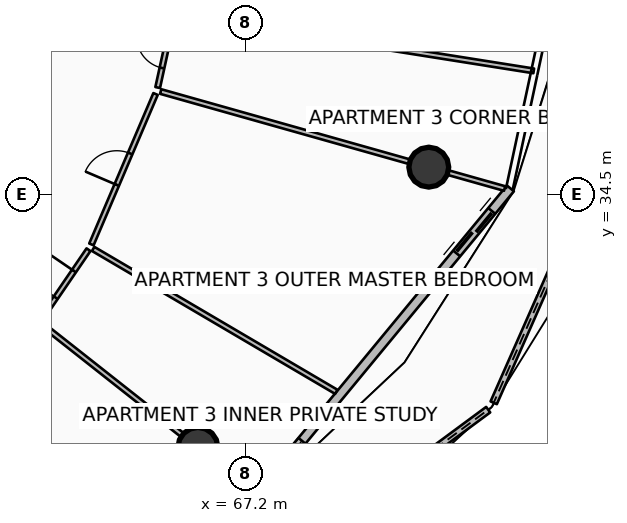
"""IFC4 building model, lengths in metres.
Left out: names, types, materials, properties, quantities, classifications, styles, units other than length and angle.
Written with IfcOpenShell. Run it as: python <this file> out.ifc"""

import sys

from ifc_helpers import new_model, si_unit, direction, frame, frame_2d, origin, origin_2d, place, context, subcontext, project, spatial, polyline, rectangle, circle, outline, extrude, element, fill, save


model = new_model("IFC4")
c1 = context("Model", 3, precision=1e-05, world=origin(), true_north=direction((0.0, 1.0)))
c2 = subcontext(c1, "Body", "Model", "MODEL_VIEW")
j1 = project(units=[si_unit("LENGTHUNIT", "METRE"), si_unit("PLANEANGLEUNIT", "RADIAN")], contexts=[c1])
p1 = place(None, origin())
s1 = spatial("IfcSite", under=j1, at=p1, CompositionType="ELEMENT")
p2 = place(p1, origin())
s2 = spatial("IfcBuilding", under=s1, at=p2, CompositionType="ELEMENT")
p3 = place(p2, frame((0.0, 0.0, 184.05)))
s3 = spatial("IfcBuildingStorey", under=s2, at=p3, CompositionType="ELEMENT", Elevation=184.05)
for number, where, z_axis, x_axis in (
    (1, (65.944, 27.854, 0.0), (0.0, 0.0, 1.0), (1.0, 0.0, 0.0)),
    (2, (72.02, 35.226, 0.0), (0.0, 0.0, 1.0), (1.0, 0.0, 0.0)),
):
    element("IfcColumn", number, at=place(p3, frame(where, z_axis=z_axis, x_axis=x_axis)), inside=s3, PredefinedType="COLUMN", context=c2, shape_type="SweptSolid", body=[
        extrude(circle(Radius=0.525, at=origin_2d()), origin(), (0.0, 0.0, 1.0), 3.5),
    ])
p4 = place(p3, frame((64.914, 22.439, 0.0), z_axis=(0.0, 0.0, 1.0), x_axis=(0.804266043661, 0.594269409454, 0.0)))
e3 = element("IfcWall", 3, at=p4, inside=s3, PredefinedType="PARAPET", context=c2, shape_type="SweptSolid", body=[
    extrude(outline(polyline([(0.0, 0.0), (10.778, 0.0), (10.778, 1.832), (5.389, 1.696), (0.0, 1.497), (0.0, 0.0)])), frame((0.0, 0.09, 0.0), z_axis=(0.0, -1.0, 0.0), x_axis=(1.0, 0.0, 0.0)), (0.0, 0.0, 1.0), 0.18),
])
p5 = place(p3, frame((73.728, 29.025, 0.0), z_axis=(0.0, 0.0, 1.0), x_axis=(0.403762319035, 0.914863918694, 0.0)))
e4 = element("IfcWall", 4, at=p5, inside=s3, PredefinedType="PARAPET", context=c2, shape_type="SweptSolid", body=[
    extrude(outline(polyline([(0.0, 0.0), (11.37, 0.0), (11.37, 1.756), (5.685, 1.853), (0.0, 1.832), (0.0, 0.0)])), frame((0.0, 0.09, 0.0), z_axis=(0.0, -1.0, 0.0), x_axis=(1.0, 0.0, 0.0)), (0.0, 0.0, 1.0), 0.18),
])
p6 = place(p3, frame((67.485, 26.576, 0.0), z_axis=(0.0, 0.0, 1.0), x_axis=(0.636759394418, 0.771062561418, 0.0)))
e5 = element("IfcWall", 5, at=p6, inside=s3, PredefinedType="SOLIDWALL", context=c2, shape_type="SweptSolid", body=[
    extrude(rectangle(XDim=10.494, YDim=0.24, at=frame_2d((5.247, 0.0))), origin(), (0.0, 0.0, 1.0), 2.45),
])
p7 = place(p6, frame((8.274, 0.0, 0.0)))
e6 = element("IfcOpeningElement", 6, at=p7, cuts=e5, PredefinedType="OPENING", context=c2, shape_type="SweptSolid", body=[
    extrude(rectangle(XDim=1.45, YDim=2.15, at=frame_2d((0.725, 1.075))), frame((0.0, 0.13, 0.0), z_axis=(0.0, -1.0, 0.0), x_axis=(1.0, 0.0, 0.0)), (0.0, 0.0, 1.0), 0.26),
])
p8 = place(p6, frame((0.28, 0.0, 0.65)))
e7 = element("IfcOpeningElement", 7, at=p8, cuts=e5, PredefinedType="OPENING", context=c2, shape_type="SweptSolid", body=[
    extrude(rectangle(XDim=1.6, YDim=1.5, at=frame_2d((0.8, 0.75))), frame((0.0, 0.13, 0.0), z_axis=(0.0, -1.0, 0.0), x_axis=(1.0, 0.0, 0.0)), (0.0, 0.0, 1.0), 0.26),
])
p9 = place(p3, frame((61.843, 31.087, 0.0), z_axis=(0.0, 0.0, 1.0), x_axis=(0.785327813677, -0.619080144299, 0.0)))
e8 = element("IfcWall", 8, at=p9, inside=s3, PredefinedType="PARTITIONING", context=c2, shape_type="SweptSolid", body=[
    extrude(rectangle(XDim=7.2, YDim=0.125, at=frame_2d((3.6, 0.0))), origin(), (0.0, 0.0, 1.0), 2.94),
])
p10 = place(p3, frame((63.188, 33.074, 0.0), z_axis=(0.0, 0.0, 1.0), x_axis=(0.862139654636, -0.506670717433, 0.0)))
e9 = element("IfcWall", 9, at=p10, inside=s3, PredefinedType="PARTITIONING", context=c2, shape_type="SweptSolid", body=[
    extrude(rectangle(XDim=7.421, YDim=0.125, at=frame_2d((3.71, 0.0))), origin(), (0.0, 0.0, 1.0), 2.94),
])
p11 = place(p3, frame((61.821, 31.232, 0.0), z_axis=(0.0, 0.0, 1.0), x_axis=(0.56426341076, 0.82559481786, 0.0)))
e10 = element("IfcWall", 10, at=p11, inside=s3, PredefinedType="PARTITIONING", context=c2, shape_type="SweptSolid", body=[
    extrude(rectangle(XDim=2.207, YDim=0.125, at=frame_2d((1.103, 0.0))), origin(), (0.0, 0.0, 1.0), 2.94),
])
p12 = place(p11, frame((0.678, 0.0, 0.0)))
e11 = element("IfcOpeningElement", 11, at=p12, cuts=e10, PredefinedType="OPENING", context=c2, shape_type="SweptSolid", body=[
    extrude(rectangle(XDim=0.85, YDim=2.06, at=frame_2d((0.425, 1.03))), frame((0.0, 0.073, 0.0), z_axis=(0.0, -1.0, 0.0), x_axis=(1.0, 0.0, 0.0)), (0.0, 0.0, 1.0), 0.145),
])
p13 = place(p3, frame((63.142, 33.193, 0.0), z_axis=(0.0, 0.0, 1.0), x_axis=(0.392302335844, 0.919836331796, 0.0)))
e12 = element("IfcWall", 12, at=p13, inside=s3, PredefinedType="PARTITIONING", context=c2, shape_type="SweptSolid", body=[
    extrude(rectangle(XDim=4.302, YDim=0.125, at=frame_2d((2.151, 0.0))), origin(), (0.0, 0.0, 1.0), 2.94),
])
p14 = place(p13, frame((1.701, 0.0, 0.0)))
e13 = element("IfcOpeningElement", 13, at=p14, cuts=e12, PredefinedType="OPENING", context=c2, shape_type="SweptSolid", body=[
    extrude(rectangle(XDim=0.9, YDim=2.08, at=frame_2d((0.45, 1.04))), frame((0.0, 0.073, 0.0), z_axis=(0.0, -1.0, 0.0), x_axis=(1.0, 0.0, 0.0)), (0.0, 0.0, 1.0), 0.145),
])
p15 = place(p3, frame((64.965, 37.215, 0.0), z_axis=(0.0, 0.0, 1.0), x_axis=(0.962454024137, -0.271444748378, 0.0)))
e14 = element("IfcWall", 14, at=p15, inside=s3, PredefinedType="PARTITIONING", context=c2, shape_type="SweptSolid", body=[
    extrude(rectangle(XDim=9.403, YDim=0.125, at=frame_2d((4.702, 0.0))), origin(), (0.0, 0.0, 1.0), 2.94),
])
p16 = place(p3, frame((65.4, 39.244, 0.0), z_axis=(0.0, 0.0, 1.0), x_axis=(0.987688031288, -0.156436417916, 0.0)))
e15 = element("IfcWall", 15, at=p16, inside=s3, PredefinedType="PARTITIONING", context=c2, shape_type="SweptSolid", body=[
    extrude(rectangle(XDim=9.498, YDim=0.125, at=frame_2d((4.749, 0.0))), origin(), (0.0, 0.0, 1.0), 2.94),
])
p17 = place(p3, frame((64.886, 37.321, 0.0), z_axis=(0.0, 0.0, 1.0), x_axis=(0.214404311004, 0.976744998156, 0.0)))
e16 = element("IfcWall", 16, at=p17, inside=s3, PredefinedType="PARTITIONING", context=c2, shape_type="SweptSolid", body=[
    extrude(rectangle(XDim=1.904, YDim=0.125, at=frame_2d((0.952, 0.0))), origin(), (0.0, 0.0, 1.0), 2.94),
])
p18 = place(p17, frame((0.527, 0.0, 0.0)))
e17 = element("IfcOpeningElement", 17, at=p18, cuts=e16, PredefinedType="OPENING", context=c2, shape_type="SweptSolid", body=[
    extrude(rectangle(XDim=0.85, YDim=2.06, at=frame_2d((0.425, 1.03))), frame((0.0, 0.073, 0.0), z_axis=(0.0, -1.0, 0.0), x_axis=(1.0, 0.0, 0.0)), (0.0, 0.0, 1.0), 0.145),
])
p19 = place(p7, origin())
e18 = element("IfcDoor", 18, at=p19, inside=s3, OperationType="DOUBLE_DOOR_SLIDING", PredefinedType="DOOR", context=c2, shape_type="SweptSolid", body=[
    extrude(rectangle(XDim=1.45, YDim=2.15, at=frame_2d((0.725, 1.075))), frame((0.0, 0.025, 0.0), z_axis=(0.0, -1.0, 0.0), x_axis=(1.0, 0.0, 0.0)), (0.0, 0.0, 1.0), 0.05),
])
fill(e6, e18)
p20 = place(p8, origin())
e19 = element("IfcWindow", 19, at=p20, inside=s3, PartitioningType="SINGLE_PANEL", PredefinedType="WINDOW", context=c2, shape_type="SweptSolid", body=[
    extrude(rectangle(XDim=1.6, YDim=1.5, at=frame_2d((0.8, 0.75))), frame((0.0, 0.03, 0.0), z_axis=(0.0, -1.0, 0.0), x_axis=(1.0, 0.0, 0.0)), (0.0, 0.0, 1.0), 0.06),
])
fill(e7, e19)
p21 = place(p12, origin())
e20 = element("IfcDoor", 20, at=p21, inside=s3, OperationType="SINGLE_SWING_RIGHT", PredefinedType="DOOR", context=c2, shape_type="SweptSolid", body=[
    extrude(rectangle(XDim=0.85, YDim=2.06, at=frame_2d((0.425, 1.03))), frame((0.0, 0.025, 0.0), z_axis=(0.0, -1.0, 0.0), x_axis=(1.0, 0.0, 0.0)), (0.0, 0.0, 1.0), 0.05),
])
fill(e11, e20)
p22 = place(p14, origin())
e21 = element("IfcDoor", 21, at=p22, inside=s3, OperationType="SINGLE_SWING_LEFT", PredefinedType="DOOR", context=c2, shape_type="SweptSolid", body=[
    extrude(rectangle(XDim=0.9, YDim=2.08, at=frame_2d((0.45, 1.04))), frame((0.0, 0.025, 0.0), z_axis=(0.0, -1.0, 0.0), x_axis=(1.0, 0.0, 0.0)), (0.0, 0.0, 1.0), 0.05),
])
fill(e13, e21)
p23 = place(p18, origin())
e22 = element("IfcDoor", 22, at=p23, inside=s3, OperationType="SINGLE_SWING_RIGHT", PredefinedType="DOOR", context=c2, shape_type="SweptSolid", body=[
    extrude(rectangle(XDim=0.85, YDim=2.06, at=frame_2d((0.425, 1.03))), frame((0.0, 0.025, 0.0), z_axis=(0.0, -1.0, 0.0), x_axis=(1.0, 0.0, 0.0)), (0.0, 0.0, 1.0), 0.05),
])
fill(e17, e22)
save(model, sys.argv[1])
